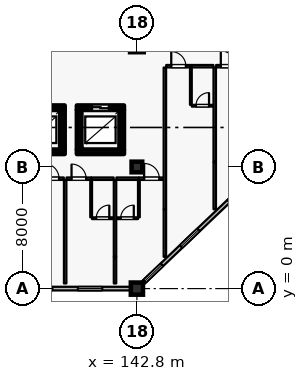
"""IFC4 building model, lengths in metres.
Left out: names, types, materials, properties, quantities, classifications, styles, units other than length and angle.
Written with IfcOpenShell. Run it as: python <this file> out.ifc"""

import sys

from ifc_helpers import new_model, si_unit, direction, frame, frame_2d, origin, origin_2d, place, context, subcontext, project, spatial, rectangle, extrude, element, fill, save


model = new_model("IFC4")
c1 = context("Model", 3, precision=1e-05, world=origin(), true_north=direction((0.0, 1.0)))
c2 = subcontext(c1, "Body", "Model", "MODEL_VIEW")
j1 = project(units=[si_unit("LENGTHUNIT", "METRE"), si_unit("PLANEANGLEUNIT", "RADIAN")], contexts=[c1])
p1 = place(None, origin())
s1 = spatial("IfcSite", under=j1, at=p1, CompositionType="ELEMENT")
p2 = place(p1, origin())
s2 = spatial("IfcBuilding", under=s1, at=p2, CompositionType="ELEMENT")
p3 = place(p2, frame((0.0, 0.0, 16.2)))
s3 = spatial("IfcBuildingStorey", under=s2, at=p3, CompositionType="ELEMENT", Elevation=16.2)
p4 = place(p3, frame((142.8, 0.0, 0.0), z_axis=(0.0, 0.0, 1.0), x_axis=(1.0, 0.0, 0.0)))
e1 = element("IfcColumn", 1, at=p4, inside=s3, PredefinedType="COLUMN", context=c2, shape_type="SweptSolid", body=[
    extrude(rectangle(XDim=0.8, YDim=0.8, at=origin_2d()), origin(), (0.0, 0.0, 1.0), 4.8),
])
p5 = place(p3, frame((142.8, 8.0, 0.0), z_axis=(0.0, 0.0, 1.0), x_axis=(1.0, 0.0, 0.0)))
e2 = element("IfcColumn", 2, at=p5, inside=s3, PredefinedType="COLUMN", context=c2, shape_type="SweptSolid", body=[
    extrude(rectangle(XDim=0.7, YDim=0.7, at=origin_2d()), origin(), (0.0, 0.0, 1.0), 4.8),
])
p6 = place(p3, frame((142.4, 0.0, 0.0), z_axis=(0.0, 0.0, 1.0), x_axis=(-1.0, 0.0, 0.0)))
e3 = element("IfcWall", 3, at=p6, inside=s3, PredefinedType="SOLIDWALL", context=c2, shape_type="SweptSolid", body=[
    extrude(rectangle(XDim=7.6, YDim=0.24, at=frame_2d((3.8, 0.0))), origin(), (0.0, 0.0, 1.0), 4.13),
])
p7 = place(p6, frame((1.88, 0.0, 0.8)))
e4 = element("IfcOpeningElement", 4, at=p7, cuts=e3, PredefinedType="OPENING", context=c2, shape_type="SweptSolid", body=[
    extrude(rectangle(XDim=1.6, YDim=1.6, at=frame_2d((0.8, 0.8))), frame((0.0, 0.13, 0.0), z_axis=(0.0, -1.0, 0.0), x_axis=(1.0, 0.0, 0.0)), (0.0, 0.0, 1.0), 0.26),
])
p8 = place(p6, frame((5.16, 0.0, 0.8)))
e5 = element("IfcOpeningElement", 5, at=p8, cuts=e3, PredefinedType="OPENING", context=c2, shape_type="SweptSolid", body=[
    extrude(rectangle(XDim=1.6, YDim=1.6, at=frame_2d((0.8, 0.8))), frame((0.0, 0.13, 0.0), z_axis=(0.0, -1.0, 0.0), x_axis=(1.0, 0.0, 0.0)), (0.0, 0.0, 1.0), 0.26),
])
p9 = place(p3, frame((150.8, 7.619, 0.0), z_axis=(0.0, 0.0, 1.0), x_axis=(-0.724156739794, -0.689635422677, 0.0)))
e6 = element("IfcWall", 6, at=p9, inside=s3, PredefinedType="SOLIDWALL", context=c2, shape_type="SweptSolid", body=[
    extrude(rectangle(XDim=10.495, YDim=0.24, at=frame_2d((5.248, 0.0))), origin(), (0.0, 0.0, 1.0), 4.13),
])
p10 = place(p9, frame((1.12, 0.0, 0.8)))
e7 = element("IfcOpeningElement", 7, at=p10, cuts=e6, PredefinedType="OPENING", context=c2, shape_type="SweptSolid", body=[
    extrude(rectangle(XDim=1.6, YDim=1.6, at=frame_2d((0.8, 0.8))), frame((0.0, 0.13, 0.0), z_axis=(0.0, -1.0, 0.0), x_axis=(1.0, 0.0, 0.0)), (0.0, 0.0, 1.0), 0.26),
])
p11 = place(p9, frame((5.442, 0.0, 0.8)))
e8 = element("IfcOpeningElement", 8, at=p11, cuts=e6, PredefinedType="OPENING", context=c2, shape_type="SweptSolid", body=[
    extrude(rectangle(XDim=1.6, YDim=1.6, at=frame_2d((0.8, 0.8))), frame((0.0, 0.13, 0.0), z_axis=(0.0, -1.0, 0.0), x_axis=(1.0, 0.0, 0.0)), (0.0, 0.0, 1.0), 0.26),
])
p12 = place(p9, frame((8.77, 0.0, 0.8)))
e9 = element("IfcOpeningElement", 9, at=p12, cuts=e6, PredefinedType="OPENING", context=c2, shape_type="SweptSolid", body=[
    extrude(rectangle(XDim=1.6, YDim=1.6, at=frame_2d((0.8, 0.8))), frame((0.0, 0.13, 0.0), z_axis=(0.0, -1.0, 0.0), x_axis=(1.0, 0.0, 0.0)), (0.0, 0.0, 1.0), 0.26),
])
p13 = place(p3, frame((134.95, 9.0, 0.0), z_axis=(0.0, 0.0, 1.0), x_axis=(1.0, 0.0, 0.0)))
e10 = element("IfcWall", 10, at=p13, inside=s3, PredefinedType="SHEAR", context=c2, shape_type="SweptSolid", body=[
    extrude(rectangle(XDim=3.1, YDim=0.3, at=frame_2d((1.55, 0.0))), origin(), (0.0, 0.0, 1.0), 4.535),
])
p14 = place(p3, frame((137.9, 9.155, 0.0), z_axis=(0.0, 0.0, 1.0), x_axis=(0.0, 1.0, 0.0)))
e11 = element("IfcWall", 11, at=p14, inside=s3, PredefinedType="SHEAR", context=c2, shape_type="SweptSolid", body=[
    extrude(rectangle(XDim=2.59, YDim=0.3, at=frame_2d((1.295, 0.0))), origin(), (0.0, 0.0, 1.0), 4.535),
])
p15 = place(p3, frame((138.05, 11.9, 0.0), z_axis=(0.0, 0.0, 1.0), x_axis=(-1.0, 0.0, 0.0)))
e12 = element("IfcWall", 12, at=p15, inside=s3, PredefinedType="SHEAR", context=c2, shape_type="SweptSolid", body=[
    extrude(rectangle(XDim=3.1, YDim=0.3, at=frame_2d((1.55, 0.0))), origin(), (0.0, 0.0, 1.0), 4.535),
])
p16 = place(p15, frame((1.0, 0.0, 0.0)))
e13 = element("IfcOpeningElement", 13, at=p16, cuts=e12, PredefinedType="OPENING", context=c2, shape_type="SweptSolid", body=[
    extrude(rectangle(XDim=1.1, YDim=2.2, at=frame_2d((0.55, 1.1))), frame((0.0, 0.16, 0.0), z_axis=(0.0, -1.0, 0.0), x_axis=(1.0, 0.0, 0.0)), (0.0, 0.0, 1.0), 0.32),
])
p17 = place(p3, frame((138.85, 9.0, 0.0), z_axis=(0.0, 0.0, 1.0), x_axis=(1.0, 0.0, 0.0)))
e14 = element("IfcWall", 14, at=p17, inside=s3, PredefinedType="SHEAR", context=c2, shape_type="SweptSolid", body=[
    extrude(rectangle(XDim=3.1, YDim=0.3, at=frame_2d((1.55, 0.0))), origin(), (0.0, 0.0, 1.0), 4.535),
])
p18 = place(p3, frame((141.8, 9.155, 0.0), z_axis=(0.0, 0.0, 1.0), x_axis=(0.0, 1.0, 0.0)))
e15 = element("IfcWall", 15, at=p18, inside=s3, PredefinedType="SHEAR", context=c2, shape_type="SweptSolid", body=[
    extrude(rectangle(XDim=2.59, YDim=0.3, at=frame_2d((1.295, 0.0))), origin(), (0.0, 0.0, 1.0), 4.535),
])
p19 = place(p3, frame((141.95, 11.9, 0.0), z_axis=(0.0, 0.0, 1.0), x_axis=(-1.0, 0.0, 0.0)))
e16 = element("IfcWall", 16, at=p19, inside=s3, PredefinedType="SHEAR", context=c2, shape_type="SweptSolid", body=[
    extrude(rectangle(XDim=3.1, YDim=0.3, at=frame_2d((1.55, 0.0))), origin(), (0.0, 0.0, 1.0), 4.535),
])
p20 = place(p19, frame((1.0, 0.0, 0.0)))
e17 = element("IfcOpeningElement", 17, at=p20, cuts=e16, PredefinedType="OPENING", context=c2, shape_type="SweptSolid", body=[
    extrude(rectangle(XDim=1.1, YDim=2.2, at=frame_2d((0.55, 1.1))), frame((0.0, 0.16, 0.0), z_axis=(0.0, -1.0, 0.0), x_axis=(1.0, 0.0, 0.0)), (0.0, 0.0, 1.0), 0.32),
])
p21 = place(p3, frame((139.0, 11.745, 0.0), z_axis=(0.0, 0.0, 1.0), x_axis=(0.0, -1.0, 0.0)))
e18 = element("IfcWall", 18, at=p21, inside=s3, PredefinedType="SHEAR", context=c2, shape_type="SweptSolid", body=[
    extrude(rectangle(XDim=2.59, YDim=0.3, at=frame_2d((1.295, 0.0))), origin(), (0.0, 0.0, 1.0), 4.535),
])
p22 = place(p3, frame((136.37, 7.23, 0.0), z_axis=(0.0, 0.0, 1.0), x_axis=(1.0, 0.0, 0.0)))
e19 = element("IfcWall", 19, at=p22, inside=s3, PredefinedType="PARTITIONING", context=c2, shape_type="SweptSolid", body=[
    extrude(rectangle(XDim=1.62, YDim=0.16, at=frame_2d((0.81, 0.0))), origin(), (0.0, 0.0, 1.0), 4.535),
])
p23 = place(p22, frame((0.31, 0.0, 0.0)))
e20 = element("IfcOpeningElement", 20, at=p23, cuts=e19, PredefinedType="OPENING", context=c2, shape_type="SweptSolid", body=[
    extrude(rectangle(XDim=1.0, YDim=2.25, at=frame_2d((0.5, 1.125))), frame((0.0, 0.09, 0.0), z_axis=(0.0, -1.0, 0.0), x_axis=(1.0, 0.0, 0.0)), (0.0, 0.0, 1.0), 0.18),
])
p24 = place(p3, frame((138.17, 7.23, 0.0), z_axis=(0.0, 0.0, 1.0), x_axis=(1.0, 0.0, 0.0)))
e21 = element("IfcWall", 21, at=p24, inside=s3, PredefinedType="PARTITIONING", context=c2, shape_type="SweptSolid", body=[
    extrude(rectangle(XDim=1.62, YDim=0.16, at=frame_2d((0.81, 0.0))), origin(), (0.0, 0.0, 1.0), 4.535),
])
p25 = place(p24, frame((0.33, 0.0, 0.0)))
e22 = element("IfcOpeningElement", 22, at=p25, cuts=e21, PredefinedType="OPENING", context=c2, shape_type="SweptSolid", body=[
    extrude(rectangle(XDim=0.96, YDim=2.2, at=frame_2d((0.48, 1.1))), frame((0.0, 0.09, 0.0), z_axis=(0.0, -1.0, 0.0), x_axis=(1.0, 0.0, 0.0)), (0.0, 0.0, 1.0), 0.18),
])
p26 = place(p3, frame((139.8, 7.23, 0.0), z_axis=(0.0, 0.0, 1.0), x_axis=(1.0, 0.0, 0.0)))
e23 = element("IfcWall", 23, at=p26, inside=s3, PredefinedType="PARTITIONING", context=c2, shape_type="SweptSolid", body=[
    extrude(rectangle(XDim=1.47, YDim=0.16, at=frame_2d((0.735, 0.0))), origin(), (0.0, 0.0, 1.0), 4.535),
])
p27 = place(p3, frame((139.79, 4.69, 0.0), z_axis=(0.0, 0.0, 1.0), x_axis=(0.0, 1.0, 0.0)))
e24 = element("IfcWall", 24, at=p27, inside=s3, PredefinedType="PARTITIONING", context=c2, shape_type="SweptSolid", body=[
    extrude(rectangle(XDim=2.45, YDim=0.115, at=frame_2d((1.225, 0.0))), origin(), (0.0, 0.0, 1.0), 4.535),
])
p28 = place(p3, frame((139.85, 4.63, 0.0), z_axis=(0.0, 0.0, 1.0), x_axis=(1.0, 0.0, 0.0)))
e25 = element("IfcWall", 25, at=p28, inside=s3, PredefinedType="PARTITIONING", context=c2, shape_type="SweptSolid", body=[
    extrude(rectangle(XDim=1.41, YDim=0.115, at=frame_2d((0.705, 0.0))), origin(), (0.0, 0.0, 1.0), 4.535),
])
p29 = place(p28, frame((0.275, 0.0, 0.0)))
e26 = element("IfcOpeningElement", 26, at=p29, cuts=e25, PredefinedType="OPENING", context=c2, shape_type="SweptSolid", body=[
    extrude(rectangle(XDim=0.86, YDim=2.12, at=frame_2d((0.43, 1.06))), frame((0.0, 0.067, 0.0), z_axis=(0.0, -1.0, 0.0), x_axis=(1.0, 0.0, 0.0)), (0.0, 0.0, 1.0), 0.135),
])
p30 = place(p3, frame((138.08, 0.34, 0.0), z_axis=(0.0, 0.0, 1.0), x_axis=(0.0, 1.0, 0.0)))
e27 = element("IfcWall", 27, at=p30, inside=s3, PredefinedType="PARTITIONING", context=c2, shape_type="SweptSolid", body=[
    extrude(rectangle(XDim=6.8, YDim=0.16, at=frame_2d((3.4, 0.0))), origin(), (0.0, 0.0, 1.0), 4.535),
])
p31 = place(p3, frame((141.36, 0.34, 0.0), z_axis=(0.0, 0.0, 1.0), x_axis=(0.0, 1.0, 0.0)))
e28 = element("IfcWall", 28, at=p31, inside=s3, PredefinedType="PARTITIONING", context=c2, shape_type="SweptSolid", body=[
    extrude(rectangle(XDim=1.74, YDim=0.16, at=frame_2d((0.87, 0.0))), origin(), (0.0, 0.0, 1.0), 4.535),
])
p32 = place(p3, frame((141.45, 7.23, 0.0), z_axis=(0.0, 0.0, 1.0), x_axis=(1.0, 0.0, 0.0)))
e29 = element("IfcWall", 29, at=p32, inside=s3, PredefinedType="PARTITIONING", context=c2, shape_type="SweptSolid", body=[
    extrude(rectangle(XDim=1.47, YDim=0.16, at=frame_2d((0.735, 0.0))), origin(), (0.0, 0.0, 1.0), 4.535),
])
p33 = place(p3, frame((142.93, 7.23, 0.0), z_axis=(0.0, 0.0, 1.0), x_axis=(1.0, 0.0, 0.0)))
e30 = element("IfcWall", 30, at=p33, inside=s3, PredefinedType="PARTITIONING", context=c2, shape_type="SweptSolid", body=[
    extrude(rectangle(XDim=1.62, YDim=0.16, at=frame_2d((0.81, 0.0))), origin(), (0.0, 0.0, 1.0), 4.535),
])
p34 = place(p33, frame((0.346, 0.0, 0.0)))
e31 = element("IfcOpeningElement", 31, at=p34, cuts=e30, PredefinedType="OPENING", context=c2, shape_type="SweptSolid", body=[
    extrude(rectangle(XDim=1.0, YDim=2.25, at=frame_2d((0.5, 1.125))), frame((0.0, 0.09, 0.0), z_axis=(0.0, -1.0, 0.0), x_axis=(1.0, 0.0, 0.0)), (0.0, 0.0, 1.0), 0.18),
])
p35 = place(p3, frame((142.93, 4.69, 0.0), z_axis=(0.0, 0.0, 1.0), x_axis=(0.0, 1.0, 0.0)))
e32 = element("IfcWall", 32, at=p35, inside=s3, PredefinedType="PARTITIONING", context=c2, shape_type="SweptSolid", body=[
    extrude(rectangle(XDim=2.45, YDim=0.115, at=frame_2d((1.225, 0.0))), origin(), (0.0, 0.0, 1.0), 4.535),
])
p36 = place(p3, frame((141.46, 4.63, 0.0), z_axis=(0.0, 0.0, 1.0), x_axis=(1.0, 0.0, 0.0)))
e33 = element("IfcWall", 33, at=p36, inside=s3, PredefinedType="PARTITIONING", context=c2, shape_type="SweptSolid", body=[
    extrude(rectangle(XDim=1.41, YDim=0.115, at=frame_2d((0.705, 0.0))), origin(), (0.0, 0.0, 1.0), 4.535),
])
p37 = place(p36, frame((0.275, 0.0, 0.0)))
e34 = element("IfcOpeningElement", 34, at=p37, cuts=e33, PredefinedType="OPENING", context=c2, shape_type="SweptSolid", body=[
    extrude(rectangle(XDim=0.86, YDim=2.12, at=frame_2d((0.43, 1.06))), frame((0.0, 0.067, 0.0), z_axis=(0.0, -1.0, 0.0), x_axis=(1.0, 0.0, 0.0)), (0.0, 0.0, 1.0), 0.135),
])
p38 = place(p3, frame((141.36, 2.09, 0.0), z_axis=(0.0, 0.0, 1.0), x_axis=(0.0, 1.0, 0.0)))
e35 = element("IfcWall", 35, at=p38, inside=s3, PredefinedType="PARTITIONING", context=c2, shape_type="SweptSolid", body=[
    extrude(rectangle(XDim=5.05, YDim=0.16, at=frame_2d((2.525, 0.0))), origin(), (0.0, 0.0, 1.0), 4.535),
])
p39 = place(p3, frame((144.64, 2.09, 0.0), z_axis=(0.0, 0.0, 1.0), x_axis=(0.0, 1.0, 0.0)))
e36 = element("IfcWall", 36, at=p39, inside=s3, PredefinedType="PARTITIONING", context=c2, shape_type="SweptSolid", body=[
    extrude(rectangle(XDim=3.12, YDim=0.16, at=frame_2d((1.56, 0.0))), origin(), (0.0, 0.0, 1.0), 4.535),
])
p40 = place(p3, frame((144.73, 14.63, 0.0), z_axis=(0.0, 0.0, 1.0), x_axis=(1.0, 0.0, 0.0)))
e37 = element("IfcWall", 37, at=p40, inside=s3, PredefinedType="PARTITIONING", context=c2, shape_type="SweptSolid", body=[
    extrude(rectangle(XDim=1.62, YDim=0.16, at=frame_2d((0.81, 0.0))), origin(), (0.0, 0.0, 1.0), 4.535),
])
p41 = place(p40, frame((0.33, 0.0, 0.0)))
e38 = element("IfcOpeningElement", 38, at=p41, cuts=e37, PredefinedType="OPENING", context=c2, shape_type="SweptSolid", body=[
    extrude(rectangle(XDim=0.96, YDim=2.2, at=frame_2d((0.48, 1.1))), frame((0.0, 0.09, 0.0), z_axis=(0.0, -1.0, 0.0), x_axis=(1.0, 0.0, 0.0)), (0.0, 0.0, 1.0), 0.18),
])
p42 = place(p3, frame((146.36, 14.63, 0.0), z_axis=(0.0, 0.0, 1.0), x_axis=(1.0, 0.0, 0.0)))
e39 = element("IfcWall", 39, at=p42, inside=s3, PredefinedType="PARTITIONING", context=c2, shape_type="SweptSolid", body=[
    extrude(rectangle(XDim=1.47, YDim=0.16, at=frame_2d((0.735, 0.0))), origin(), (0.0, 0.0, 1.0), 4.535),
])
p43 = place(p3, frame((146.35, 12.09, 0.0), z_axis=(0.0, 0.0, 1.0), x_axis=(0.0, 1.0, 0.0)))
e40 = element("IfcWall", 40, at=p43, inside=s3, PredefinedType="PARTITIONING", context=c2, shape_type="SweptSolid", body=[
    extrude(rectangle(XDim=2.45, YDim=0.115, at=frame_2d((1.225, 0.0))), origin(), (0.0, 0.0, 1.0), 4.535),
])
p44 = place(p3, frame((146.41, 12.03, 0.0), z_axis=(0.0, 0.0, 1.0), x_axis=(1.0, 0.0, 0.0)))
e41 = element("IfcWall", 41, at=p44, inside=s3, PredefinedType="PARTITIONING", context=c2, shape_type="SweptSolid", body=[
    extrude(rectangle(XDim=1.41, YDim=0.115, at=frame_2d((0.705, 0.0))), origin(), (0.0, 0.0, 1.0), 4.535),
])
p45 = place(p44, frame((0.275, 0.0, 0.0)))
e42 = element("IfcOpeningElement", 42, at=p45, cuts=e41, PredefinedType="OPENING", context=c2, shape_type="SweptSolid", body=[
    extrude(rectangle(XDim=0.86, YDim=2.12, at=frame_2d((0.43, 1.06))), frame((0.0, 0.067, 0.0), z_axis=(0.0, -1.0, 0.0), x_axis=(1.0, 0.0, 0.0)), (0.0, 0.0, 1.0), 0.135),
])
p46 = place(p3, frame((144.64, 5.22, 0.0), z_axis=(0.0, 0.0, 1.0), x_axis=(0.0, 1.0, 0.0)))
e43 = element("IfcWall", 43, at=p46, inside=s3, PredefinedType="PARTITIONING", context=c2, shape_type="SweptSolid", body=[
    extrude(rectangle(XDim=9.32, YDim=0.16, at=frame_2d((4.66, 0.0))), origin(), (0.0, 0.0, 1.0), 4.535),
])
p47 = place(p3, frame((147.92, 5.22, 0.0), z_axis=(0.0, 0.0, 1.0), x_axis=(0.0, 1.0, 0.0)))
e44 = element("IfcWall", 44, at=p47, inside=s3, PredefinedType="PARTITIONING", context=c2, shape_type="SweptSolid", body=[
    extrude(rectangle(XDim=3.11, YDim=0.16, at=frame_2d((1.555, 0.0))), origin(), (0.0, 0.0, 1.0), 4.535),
])
p48 = place(p3, frame((148.01, 14.63, 0.0), z_axis=(0.0, 0.0, 1.0), x_axis=(1.0, 0.0, 0.0)))
e45 = element("IfcWall", 45, at=p48, inside=s3, PredefinedType="PARTITIONING", context=c2, shape_type="SweptSolid", body=[
    extrude(rectangle(XDim=1.62, YDim=0.16, at=frame_2d((0.81, 0.0))), origin(), (0.0, 0.0, 1.0), 4.535),
])
p49 = place(p48, frame((0.31, 0.0, 0.0)))
e46 = element("IfcOpeningElement", 46, at=p49, cuts=e45, PredefinedType="OPENING", context=c2, shape_type="SweptSolid", body=[
    extrude(rectangle(XDim=1.0, YDim=2.25, at=frame_2d((0.5, 1.125))), frame((0.0, 0.09, 0.0), z_axis=(0.0, -1.0, 0.0), x_axis=(1.0, 0.0, 0.0)), (0.0, 0.0, 1.0), 0.18),
])
p50 = place(p3, frame((147.92, 8.34, 0.0), z_axis=(0.0, 0.0, 1.0), x_axis=(0.0, 1.0, 0.0)))
e47 = element("IfcWall", 47, at=p50, inside=s3, PredefinedType="PARTITIONING", context=c2, shape_type="SweptSolid", body=[
    extrude(rectangle(XDim=6.2, YDim=0.16, at=frame_2d((3.1, 0.0))), origin(), (0.0, 0.0, 1.0), 4.535),
])
p51 = place(p7, origin())
e48 = element("IfcWindow", 48, at=p51, inside=s3, PartitioningType="SINGLE_PANEL", PredefinedType="WINDOW", context=c2, shape_type="SweptSolid", body=[
    extrude(rectangle(XDim=1.6, YDim=1.6, at=frame_2d((0.8, 0.8))), frame((0.0, 0.03, 0.0), z_axis=(0.0, -1.0, 0.0), x_axis=(1.0, 0.0, 0.0)), (0.0, 0.0, 1.0), 0.06),
])
fill(e4, e48)
p52 = place(p8, origin())
e49 = element("IfcWindow", 49, at=p52, inside=s3, PartitioningType="SINGLE_PANEL", PredefinedType="WINDOW", context=c2, shape_type="SweptSolid", body=[
    extrude(rectangle(XDim=1.6, YDim=1.6, at=frame_2d((0.8, 0.8))), frame((0.0, 0.03, 0.0), z_axis=(0.0, -1.0, 0.0), x_axis=(1.0, 0.0, 0.0)), (0.0, 0.0, 1.0), 0.06),
])
fill(e5, e49)
p53 = place(p11, origin())
e50 = element("IfcWindow", 50, at=p53, inside=s3, PartitioningType="SINGLE_PANEL", PredefinedType="WINDOW", context=c2, shape_type="SweptSolid", body=[
    extrude(rectangle(XDim=1.6, YDim=1.6, at=frame_2d((0.8, 0.8))), frame((0.0, 0.03, 0.0), z_axis=(0.0, -1.0, 0.0), x_axis=(1.0, 0.0, 0.0)), (0.0, 0.0, 1.0), 0.06),
])
fill(e8, e50)
p54 = place(p12, origin())
e51 = element("IfcWindow", 51, at=p54, inside=s3, PartitioningType="SINGLE_PANEL", PredefinedType="WINDOW", context=c2, shape_type="SweptSolid", body=[
    extrude(rectangle(XDim=1.6, YDim=1.6, at=frame_2d((0.8, 0.8))), frame((0.0, 0.03, 0.0), z_axis=(0.0, -1.0, 0.0), x_axis=(1.0, 0.0, 0.0)), (0.0, 0.0, 1.0), 0.06),
])
fill(e9, e51)
p55 = place(p20, origin())
e52 = element("IfcDoor", 52, at=p55, inside=s3, OperationType="DOUBLE_DOOR_SLIDING", PredefinedType="DOOR", context=c2, shape_type="SweptSolid", body=[
    extrude(rectangle(XDim=1.1, YDim=2.2, at=frame_2d((0.55, 1.1))), frame((0.0, 0.025, 0.0), z_axis=(0.0, -1.0, 0.0), x_axis=(1.0, 0.0, 0.0)), (0.0, 0.0, 1.0), 0.05),
])
fill(e17, e52)
p56 = place(p23, origin())
e53 = element("IfcDoor", 53, at=p56, inside=s3, OperationType="SINGLE_SWING_LEFT", PredefinedType="DOOR", context=c2, shape_type="SweptSolid", body=[
    extrude(rectangle(XDim=1.0, YDim=2.25, at=frame_2d((0.5, 1.125))), frame((0.0, 0.025, 0.0), z_axis=(0.0, -1.0, 0.0), x_axis=(1.0, 0.0, 0.0)), (0.0, 0.0, 1.0), 0.05),
])
fill(e20, e53)
p57 = place(p25, origin())
e54 = element("IfcDoor", 54, at=p57, inside=s3, OperationType="SINGLE_SWING_LEFT", PredefinedType="DOOR", context=c2, shape_type="SweptSolid", body=[
    extrude(rectangle(XDim=0.96, YDim=2.2, at=frame_2d((0.48, 1.1))), frame((0.0, 0.025, 0.0), z_axis=(0.0, -1.0, 0.0), x_axis=(1.0, 0.0, 0.0)), (0.0, 0.0, 1.0), 0.05),
])
fill(e22, e54)
p58 = place(p29, origin())
e55 = element("IfcDoor", 55, at=p58, inside=s3, OperationType="SINGLE_SWING_RIGHT", PredefinedType="DOOR", context=c2, shape_type="SweptSolid", body=[
    extrude(rectangle(XDim=0.86, YDim=2.12, at=frame_2d((0.43, 1.06))), frame((0.0, 0.025, 0.0), z_axis=(0.0, -1.0, 0.0), x_axis=(1.0, 0.0, 0.0)), (0.0, 0.0, 1.0), 0.05),
])
fill(e26, e55)
p59 = place(p34, origin())
e56 = element("IfcDoor", 56, at=p59, inside=s3, OperationType="SINGLE_SWING_LEFT", PredefinedType="DOOR", context=c2, shape_type="SweptSolid", body=[
    extrude(rectangle(XDim=1.0, YDim=2.25, at=frame_2d((0.5, 1.125))), frame((0.0, 0.025, 0.0), z_axis=(0.0, -1.0, 0.0), x_axis=(1.0, 0.0, 0.0)), (0.0, 0.0, 1.0), 0.05),
])
fill(e31, e56)
p60 = place(p37, origin())
e57 = element("IfcDoor", 57, at=p60, inside=s3, OperationType="SINGLE_SWING_RIGHT", PredefinedType="DOOR", context=c2, shape_type="SweptSolid", body=[
    extrude(rectangle(XDim=0.86, YDim=2.12, at=frame_2d((0.43, 1.06))), frame((0.0, 0.025, 0.0), z_axis=(0.0, -1.0, 0.0), x_axis=(1.0, 0.0, 0.0)), (0.0, 0.0, 1.0), 0.05),
])
fill(e34, e57)
p61 = place(p41, origin())
e58 = element("IfcDoor", 58, at=p61, inside=s3, OperationType="SINGLE_SWING_LEFT", PredefinedType="DOOR", context=c2, shape_type="SweptSolid", body=[
    extrude(rectangle(XDim=0.96, YDim=2.2, at=frame_2d((0.48, 1.1))), frame((0.0, 0.025, 0.0), z_axis=(0.0, -1.0, 0.0), x_axis=(1.0, 0.0, 0.0)), (0.0, 0.0, 1.0), 0.05),
])
fill(e38, e58)
p62 = place(p45, origin())
e59 = element("IfcDoor", 59, at=p62, inside=s3, OperationType="SINGLE_SWING_RIGHT", PredefinedType="DOOR", context=c2, shape_type="SweptSolid", body=[
    extrude(rectangle(XDim=0.86, YDim=2.12, at=frame_2d((0.43, 1.06))), frame((0.0, 0.025, 0.0), z_axis=(0.0, -1.0, 0.0), x_axis=(1.0, 0.0, 0.0)), (0.0, 0.0, 1.0), 0.05),
])
fill(e42, e59)
p63 = place(p49, origin())
e60 = element("IfcDoor", 60, at=p63, inside=s3, OperationType="SINGLE_SWING_LEFT", PredefinedType="DOOR", context=c2, shape_type="SweptSolid", body=[
    extrude(rectangle(XDim=1.0, YDim=2.25, at=frame_2d((0.5, 1.125))), frame((0.0, 0.025, 0.0), z_axis=(0.0, -1.0, 0.0), x_axis=(1.0, 0.0, 0.0)), (0.0, 0.0, 1.0), 0.05),
])
fill(e46, e60)
save(model, sys.argv[1])
